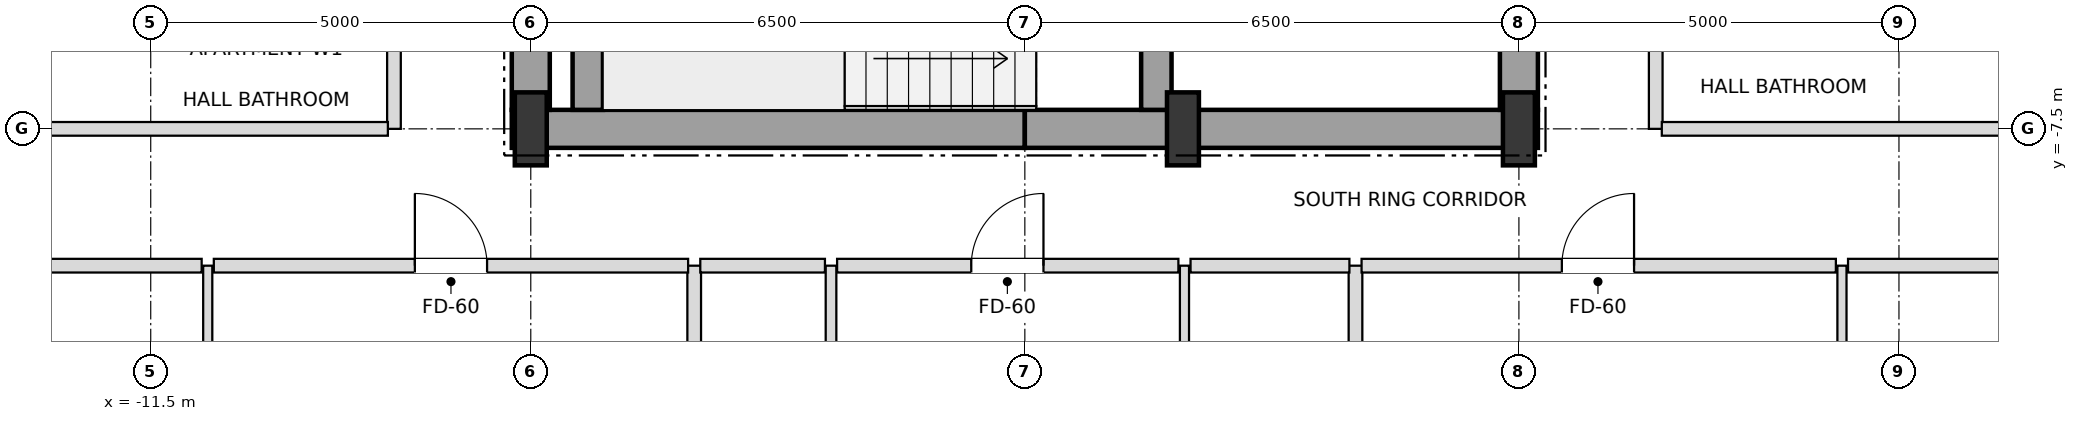
"""IFC4 building model, lengths in metres.
Left out: names, types, materials, properties, quantities, classifications, styles, units other than length and angle.
Written with IfcOpenShell. Run it as: python <this file> out.ifc"""

import sys

from ifc_helpers import new_model, si_unit, direction, frame, frame_2d, origin, origin_2d, place, context, subcontext, project, spatial, rectangle, i_section, extrude, element, fill, save


model = new_model("IFC4")
c1 = context("Model", 3, precision=1e-05, world=origin(), true_north=direction((0.0, 1.0)))
c2 = subcontext(c1, "Body", "Model", "MODEL_VIEW")
j1 = project(units=[si_unit("LENGTHUNIT", "METRE"), si_unit("PLANEANGLEUNIT", "RADIAN")], contexts=[c1])
p1 = place(None, origin())
s1 = spatial("IfcSite", under=j1, at=p1, CompositionType="ELEMENT")
p2 = place(p1, origin())
s2 = spatial("IfcBuilding", under=s1, at=p2, CompositionType="ELEMENT")
p3 = place(p2, frame((0.0, 0.0, 102.6)))
s3 = spatial("IfcBuildingStorey", under=s2, at=p3, CompositionType="ELEMENT", Elevation=102.6)
for number, where, z_axis, x_axis in (
    (1, (-6.5, -7.5, 0.0), (0.0, 0.0, 1.0), (1.0, 0.0, 0.0)),
    (2, (2.08, -7.5, 0.0), (0.0, 0.0, 1.0), (1.0, 0.0, 0.0)),
    (3, (6.5, -7.5, 0.0), (0.0, 0.0, 1.0), (1.0, 0.0, 0.0)),
):
    element("IfcColumn", number, at=place(p3, frame(where, z_axis=z_axis, x_axis=x_axis)), inside=s3, PredefinedType="COLUMN", context=c2, shape_type="SweptSolid", body=[
        extrude(i_section(OverallWidth=0.42, OverallDepth=0.96, WebThickness=0.022, FlangeThickness=0.034, at=origin_2d()), origin(), (0.0, 0.0, 1.0), 3.6),
    ])
for number, where, z_axis, x_axis in (
    (4, (-6.75, -7.5, 0.0), (0.0, 0.0, 1.0), (1.0, 0.0, 0.0)),
    (5, (0.0, -7.5, 0.0), (0.0, 0.0, 1.0), (1.0, 0.0, 0.0)),
):
    element("IfcWall", number, at=place(p3, frame(where, z_axis=z_axis, x_axis=x_axis)), inside=s3, PredefinedType="SHEAR", context=c2, shape_type="SweptSolid", body=[
        extrude(rectangle(XDim=6.75, YDim=0.5, at=frame_2d((3.375, 0.0))), origin(), (0.0, 0.0, 1.0), 3.38),
    ])
p4 = place(p3, frame((-6.5, -7.25, 0.0), z_axis=(0.0, 0.0, 1.0), x_axis=(0.0, 1.0, 0.0)))
e6 = element("IfcWall", 6, at=p4, inside=s3, PredefinedType="SHEAR", context=c2, shape_type="SweptSolid", body=[
    extrude(rectangle(XDim=3.55, YDim=0.5, at=frame_2d((1.775, 0.0))), origin(), (0.0, 0.0, 1.0), 3.38),
])
p5 = place(p3, frame((6.5, -7.25, 0.0), z_axis=(0.0, 0.0, 1.0), x_axis=(0.0, 1.0, 0.0)))
e7 = element("IfcWall", 7, at=p5, inside=s3, PredefinedType="SHEAR", context=c2, shape_type="SweptSolid", body=[
    extrude(rectangle(XDim=5.75, YDim=0.5, at=frame_2d((2.875, 0.0))), origin(), (0.0, 0.0, 1.0), 3.38),
])
p6 = place(p5, frame((0.85, 0.0, 0.0)))
e8 = element("IfcOpeningElement", 8, at=p6, cuts=e7, PredefinedType="OPENING", context=c2, shape_type="SweptSolid", body=[
    extrude(rectangle(XDim=1.05, YDim=2.15, at=frame_2d((0.525, 1.075))), frame((0.0, 0.26, 0.0), z_axis=(0.0, -1.0, 0.0), x_axis=(1.0, 0.0, 0.0)), (0.0, 0.0, 1.0), 0.52),
])
p7 = place(p3, frame((-5.75, -7.25, 0.0), z_axis=(0.0, 0.0, 1.0), x_axis=(0.0, 1.0, 0.0)))
e9 = element("IfcWall", 9, at=p7, inside=s3, PredefinedType="SHEAR", context=c2, shape_type="SweptSolid", body=[
    extrude(rectangle(XDim=2.9, YDim=0.4, at=frame_2d((1.45, 0.0))), origin(), (0.0, 0.0, 1.0), 3.38),
])
p8 = place(p3, frame((1.73, -7.25, 0.0), z_axis=(0.0, 0.0, 1.0), x_axis=(0.0, 1.0, 0.0)))
e10 = element("IfcWall", 10, at=p8, inside=s3, PredefinedType="SHEAR", context=c2, shape_type="SweptSolid", body=[
    extrude(rectangle(XDim=3.3, YDim=0.4, at=frame_2d((1.65, 0.0))), origin(), (0.0, 0.0, 1.0), 3.38),
])
p9 = place(p8, frame((0.9, 0.0, 0.0)))
e11 = element("IfcOpeningElement", 11, at=p9, cuts=e10, PredefinedType="OPENING", context=c2, shape_type="SweptSolid", body=[
    extrude(rectangle(XDim=1.05, YDim=2.15, at=frame_2d((0.525, 1.075))), frame((0.0, 0.21, 0.0), z_axis=(0.0, -1.0, 0.0), x_axis=(1.0, 0.0, 0.0)), (0.0, 0.0, 1.0), 0.42),
])
p10 = place(p3, frame((-10.75, -17.15, 0.0), z_axis=(0.0, 0.0, 1.0), x_axis=(0.0, 1.0, 0.0)))
e12 = element("IfcWall", 12, at=p10, inside=s3, PredefinedType="PARTITIONING", context=c2, shape_type="SweptSolid", body=[
    extrude(rectangle(XDim=7.85, YDim=0.12, at=frame_2d((3.925, 0.0))), origin(), (0.0, 0.0, 1.0), 2.816),
])
p11 = place(p10, frame((2.681, 0.0, 0.0)))
e13 = element("IfcOpeningElement", 13, at=p11, cuts=e12, PredefinedType="OPENING", context=c2, shape_type="SweptSolid", body=[
    extrude(rectangle(XDim=0.95, YDim=2.1, at=frame_2d((0.475, 1.05))), frame((0.0, 0.07, 0.0), z_axis=(0.0, -1.0, 0.0), x_axis=(1.0, 0.0, 0.0)), (0.0, 0.0, 1.0), 0.14),
])
p12 = place(p3, frame((-8.3, -7.5, 0.0), z_axis=(0.0, 0.0, 1.0), x_axis=(0.0, 1.0, 0.0)))
e14 = element("IfcWall", 14, at=p12, inside=s3, PredefinedType="PARTITIONING", context=c2, shape_type="SweptSolid", body=[
    extrude(rectangle(XDim=15.0, YDim=0.18, at=frame_2d((7.5, 0.0))), origin(), (0.0, 0.0, 1.0), 3.38),
])
p13 = place(p12, frame((3.145, 0.0, 0.0)))
e15 = element("IfcOpeningElement", 15, at=p13, cuts=e14, PredefinedType="OPENING", context=c2, shape_type="SweptSolid", body=[
    extrude(rectangle(XDim=0.95, YDim=2.15, at=frame_2d((0.475, 1.075))), frame((0.0, 0.1, 0.0), z_axis=(0.0, -1.0, 0.0), x_axis=(1.0, 0.0, 0.0)), (0.0, 0.0, 1.0), 0.2),
])
p14 = place(p12, frame((10.645, 0.0, 0.0)))
e16 = element("IfcOpeningElement", 16, at=p14, cuts=e14, PredefinedType="OPENING", context=c2, shape_type="SweptSolid", body=[
    extrude(rectangle(XDim=0.95, YDim=2.15, at=frame_2d((0.475, 1.075))), frame((0.0, 0.1, 0.0), z_axis=(0.0, -1.0, 0.0), x_axis=(1.0, 0.0, 0.0)), (0.0, 0.0, 1.0), 0.2),
])
p15 = place(p3, frame((-4.35, -23.15, 0.0), z_axis=(0.0, 0.0, 1.0), x_axis=(0.0, 1.0, 0.0)))
e17 = element("IfcWall", 17, at=p15, inside=s3, PredefinedType="PARTITIONING", context=c2, shape_type="SweptSolid", body=[
    extrude(rectangle(XDim=13.85, YDim=0.18, at=frame_2d((6.925, 0.0))), origin(), (0.0, 0.0, 1.0), 2.816),
])
p16 = place(p3, frame((-2.55, -17.15, 0.0), z_axis=(0.0, 0.0, 1.0), x_axis=(0.0, 1.0, 0.0)))
e18 = element("IfcWall", 18, at=p16, inside=s3, PredefinedType="PARTITIONING", context=c2, shape_type="SweptSolid", body=[
    extrude(rectangle(XDim=7.85, YDim=0.14, at=frame_2d((3.925, 0.0))), origin(), (0.0, 0.0, 1.0), 3.38),
])
p17 = place(p16, frame((3.48, 0.0, 0.0)))
e19 = element("IfcOpeningElement", 19, at=p17, cuts=e18, PredefinedType="OPENING", context=c2, shape_type="SweptSolid", body=[
    extrude(rectangle(XDim=0.9, YDim=2.1, at=frame_2d((0.45, 1.05))), frame((0.0, 0.08, 0.0), z_axis=(0.0, -1.0, 0.0), x_axis=(1.0, 0.0, 0.0)), (0.0, 0.0, 1.0), 0.16),
])
p18 = place(p3, frame((2.1, -17.15, 0.0), z_axis=(0.0, 0.0, 1.0), x_axis=(0.0, 1.0, 0.0)))
e20 = element("IfcWall", 20, at=p18, inside=s3, PredefinedType="PARTITIONING", context=c2, shape_type="SweptSolid", body=[
    extrude(rectangle(XDim=7.85, YDim=0.12, at=frame_2d((3.925, 0.0))), origin(), (0.0, 0.0, 1.0), 3.38),
])
p19 = place(p18, frame((3.455, 0.0, 0.0)))
e21 = element("IfcOpeningElement", 21, at=p19, cuts=e20, PredefinedType="OPENING", context=c2, shape_type="SweptSolid", body=[
    extrude(rectangle(XDim=0.95, YDim=2.1, at=frame_2d((0.475, 1.05))), frame((0.0, 0.07, 0.0), z_axis=(0.0, -1.0, 0.0), x_axis=(1.0, 0.0, 0.0)), (0.0, 0.0, 1.0), 0.14),
])
p20 = place(p3, frame((4.35, -23.15, 0.0), z_axis=(0.0, 0.0, 1.0), x_axis=(0.0, 1.0, 0.0)))
e22 = element("IfcWall", 22, at=p20, inside=s3, PredefinedType="PARTITIONING", context=c2, shape_type="SweptSolid", body=[
    extrude(rectangle(XDim=13.85, YDim=0.18, at=frame_2d((6.925, 0.0))), origin(), (0.0, 0.0, 1.0), 2.816),
])
p21 = place(p3, frame((8.3, -7.5, 0.0), z_axis=(0.0, 0.0, 1.0), x_axis=(0.0, 1.0, 0.0)))
e23 = element("IfcWall", 23, at=p21, inside=s3, PredefinedType="PARTITIONING", context=c2, shape_type="SweptSolid", body=[
    extrude(rectangle(XDim=15.0, YDim=0.18, at=frame_2d((7.5, 0.0))), origin(), (0.0, 0.0, 1.0), 3.38),
])
p22 = place(p21, frame((3.475, 0.0, 0.0)))
e24 = element("IfcOpeningElement", 24, at=p22, cuts=e23, PredefinedType="OPENING", context=c2, shape_type="SweptSolid", body=[
    extrude(rectangle(XDim=0.95, YDim=2.15, at=frame_2d((0.475, 1.075))), frame((0.0, 0.1, 0.0), z_axis=(0.0, -1.0, 0.0), x_axis=(1.0, 0.0, 0.0)), (0.0, 0.0, 1.0), 0.2),
])
p23 = place(p3, frame((10.75, -17.15, 0.0), z_axis=(0.0, 0.0, 1.0), x_axis=(0.0, 1.0, 0.0)))
e25 = element("IfcWall", 25, at=p23, inside=s3, PredefinedType="PARTITIONING", context=c2, shape_type="SweptSolid", body=[
    extrude(rectangle(XDim=7.85, YDim=0.12, at=frame_2d((3.925, 0.0))), origin(), (0.0, 0.0, 1.0), 2.816),
])
p24 = place(p23, frame((2.681, 0.0, 0.0)))
e26 = element("IfcOpeningElement", 26, at=p24, cuts=e25, PredefinedType="OPENING", context=c2, shape_type="SweptSolid", body=[
    extrude(rectangle(XDim=0.95, YDim=2.1, at=frame_2d((0.475, 1.05))), frame((0.0, 0.07, 0.0), z_axis=(0.0, -1.0, 0.0), x_axis=(1.0, 0.0, 0.0)), (0.0, 0.0, 1.0), 0.14),
])
p25 = place(p3, frame((-13.62, -9.3, 0.0), z_axis=(0.0, 0.0, 1.0), x_axis=(1.0, 0.0, 0.0)))
e27 = element("IfcWall", 27, at=p25, inside=s3, PredefinedType="PARTITIONING", context=c2, shape_type="SweptSolid", body=[
    extrude(rectangle(XDim=2.79, YDim=0.18, at=frame_2d((1.395, 0.0))), origin(), (0.0, 0.0, 1.0), 3.38),
])
p26 = place(p3, frame((-10.67, -9.3, 0.0), z_axis=(0.0, 0.0, 1.0), x_axis=(1.0, 0.0, 0.0)))
e28 = element("IfcWall", 28, at=p26, inside=s3, PredefinedType="PARTITIONING", context=c2, shape_type="SweptSolid", body=[
    extrude(rectangle(XDim=6.24, YDim=0.18, at=frame_2d((3.12, 0.0))), origin(), (0.0, 0.0, 1.0), 2.816),
])
p27 = place(p26, frame((2.645, 0.0, 0.0)))
e29 = element("IfcOpeningElement", 29, at=p27, cuts=e28, PredefinedType="OPENING", context=c2, shape_type="SweptSolid", body=[
    extrude(rectangle(XDim=0.95, YDim=2.15, at=frame_2d((0.475, 1.075))), frame((0.0, 0.1, 0.0), z_axis=(0.0, -1.0, 0.0), x_axis=(1.0, 0.0, 0.0)), (0.0, 0.0, 1.0), 0.2),
])
p28 = place(p3, frame((-4.27, -9.3, 0.0), z_axis=(0.0, 0.0, 1.0), x_axis=(1.0, 0.0, 0.0)))
e30 = element("IfcWall", 30, at=p28, inside=s3, PredefinedType="PARTITIONING", context=c2, shape_type="SweptSolid", body=[
    extrude(rectangle(XDim=1.64, YDim=0.18, at=frame_2d((0.82, 0.0))), origin(), (0.0, 0.0, 1.0), 3.38),
])
p29 = place(p3, frame((-2.47, -9.3, 0.0), z_axis=(0.0, 0.0, 1.0), x_axis=(1.0, 0.0, 0.0)))
e31 = element("IfcWall", 31, at=p29, inside=s3, PredefinedType="PARTITIONING", context=c2, shape_type="SweptSolid", body=[
    extrude(rectangle(XDim=4.49, YDim=0.18, at=frame_2d((2.245, 0.0))), origin(), (0.0, 0.0, 1.0), 3.38),
])
p30 = place(p29, frame((1.765, 0.0, 0.0)))
e32 = element("IfcOpeningElement", 32, at=p30, cuts=e31, PredefinedType="OPENING", context=c2, shape_type="SweptSolid", body=[
    extrude(rectangle(XDim=0.95, YDim=2.15, at=frame_2d((0.475, 1.075))), frame((0.0, 0.1, 0.0), z_axis=(0.0, -1.0, 0.0), x_axis=(1.0, 0.0, 0.0)), (0.0, 0.0, 1.0), 0.2),
])
p31 = place(p3, frame((2.18, -9.3, 0.0), z_axis=(0.0, 0.0, 1.0), x_axis=(1.0, 0.0, 0.0)))
e33 = element("IfcWall", 33, at=p31, inside=s3, PredefinedType="PARTITIONING", context=c2, shape_type="SweptSolid", body=[
    extrude(rectangle(XDim=2.09, YDim=0.18, at=frame_2d((1.045, 0.0))), origin(), (0.0, 0.0, 1.0), 3.38),
])
p32 = place(p3, frame((4.43, -9.3, 0.0), z_axis=(0.0, 0.0, 1.0), x_axis=(1.0, 0.0, 0.0)))
e34 = element("IfcWall", 34, at=p32, inside=s3, PredefinedType="PARTITIONING", context=c2, shape_type="SweptSolid", body=[
    extrude(rectangle(XDim=6.24, YDim=0.18, at=frame_2d((3.12, 0.0))), origin(), (0.0, 0.0, 1.0), 2.816),
])
p33 = place(p32, frame((2.635, 0.0, 0.0)))
e35 = element("IfcOpeningElement", 35, at=p33, cuts=e34, PredefinedType="OPENING", context=c2, shape_type="SweptSolid", body=[
    extrude(rectangle(XDim=0.95, YDim=2.15, at=frame_2d((0.475, 1.075))), frame((0.0, 0.1, 0.0), z_axis=(0.0, -1.0, 0.0), x_axis=(1.0, 0.0, 0.0)), (0.0, 0.0, 1.0), 0.2),
])
p34 = place(p3, frame((10.83, -9.3, 0.0), z_axis=(0.0, 0.0, 1.0), x_axis=(1.0, 0.0, 0.0)))
e36 = element("IfcWall", 36, at=p34, inside=s3, PredefinedType="PARTITIONING", context=c2, shape_type="SweptSolid", body=[
    extrude(rectangle(XDim=2.79, YDim=0.18, at=frame_2d((1.395, 0.0))), origin(), (0.0, 0.0, 1.0), 3.38),
])
for number, where, z_axis, x_axis in (
    (37, (-14.27, -7.5, 0.0), (0.0, 0.0, 1.0), (1.0, 0.0, 0.0)),
    (38, (8.38, -7.5, 0.0), (0.0, 0.0, 1.0), (1.0, 0.0, 0.0)),
):
    element("IfcWall", number, at=place(p3, frame(where, z_axis=z_axis, x_axis=x_axis)), inside=s3, PredefinedType="PARTITIONING", context=c2, shape_type="SweptSolid", body=[
        extrude(rectangle(XDim=5.89, YDim=0.18, at=frame_2d((2.945, 0.0))), origin(), (0.0, 0.0, 1.0), 2.816),
    ])
p35 = place(p27, origin())
e39 = element("IfcDoor", 39, at=p35, inside=s3, OperationType="SINGLE_SWING_LEFT", PredefinedType="DOOR", context=c2, shape_type="SweptSolid", body=[
    extrude(rectangle(XDim=0.95, YDim=2.15, at=frame_2d((0.475, 1.075))), frame((0.0, 0.025, 0.0), z_axis=(0.0, -1.0, 0.0), x_axis=(1.0, 0.0, 0.0)), (0.0, 0.0, 1.0), 0.05),
])
fill(e29, e39)
p36 = place(p30, origin())
e40 = element("IfcDoor", 40, at=p36, inside=s3, OperationType="SINGLE_SWING_RIGHT", PredefinedType="DOOR", context=c2, shape_type="SweptSolid", body=[
    extrude(rectangle(XDim=0.95, YDim=2.15, at=frame_2d((0.475, 1.075))), frame((0.0, 0.025, 0.0), z_axis=(0.0, -1.0, 0.0), x_axis=(1.0, 0.0, 0.0)), (0.0, 0.0, 1.0), 0.05),
])
fill(e32, e40)
p37 = place(p33, origin())
e41 = element("IfcDoor", 41, at=p37, inside=s3, OperationType="SINGLE_SWING_RIGHT", PredefinedType="DOOR", context=c2, shape_type="SweptSolid", body=[
    extrude(rectangle(XDim=0.95, YDim=2.15, at=frame_2d((0.475, 1.075))), frame((0.0, 0.025, 0.0), z_axis=(0.0, -1.0, 0.0), x_axis=(1.0, 0.0, 0.0)), (0.0, 0.0, 1.0), 0.05),
])
fill(e35, e41)
save(model, sys.argv[1])
